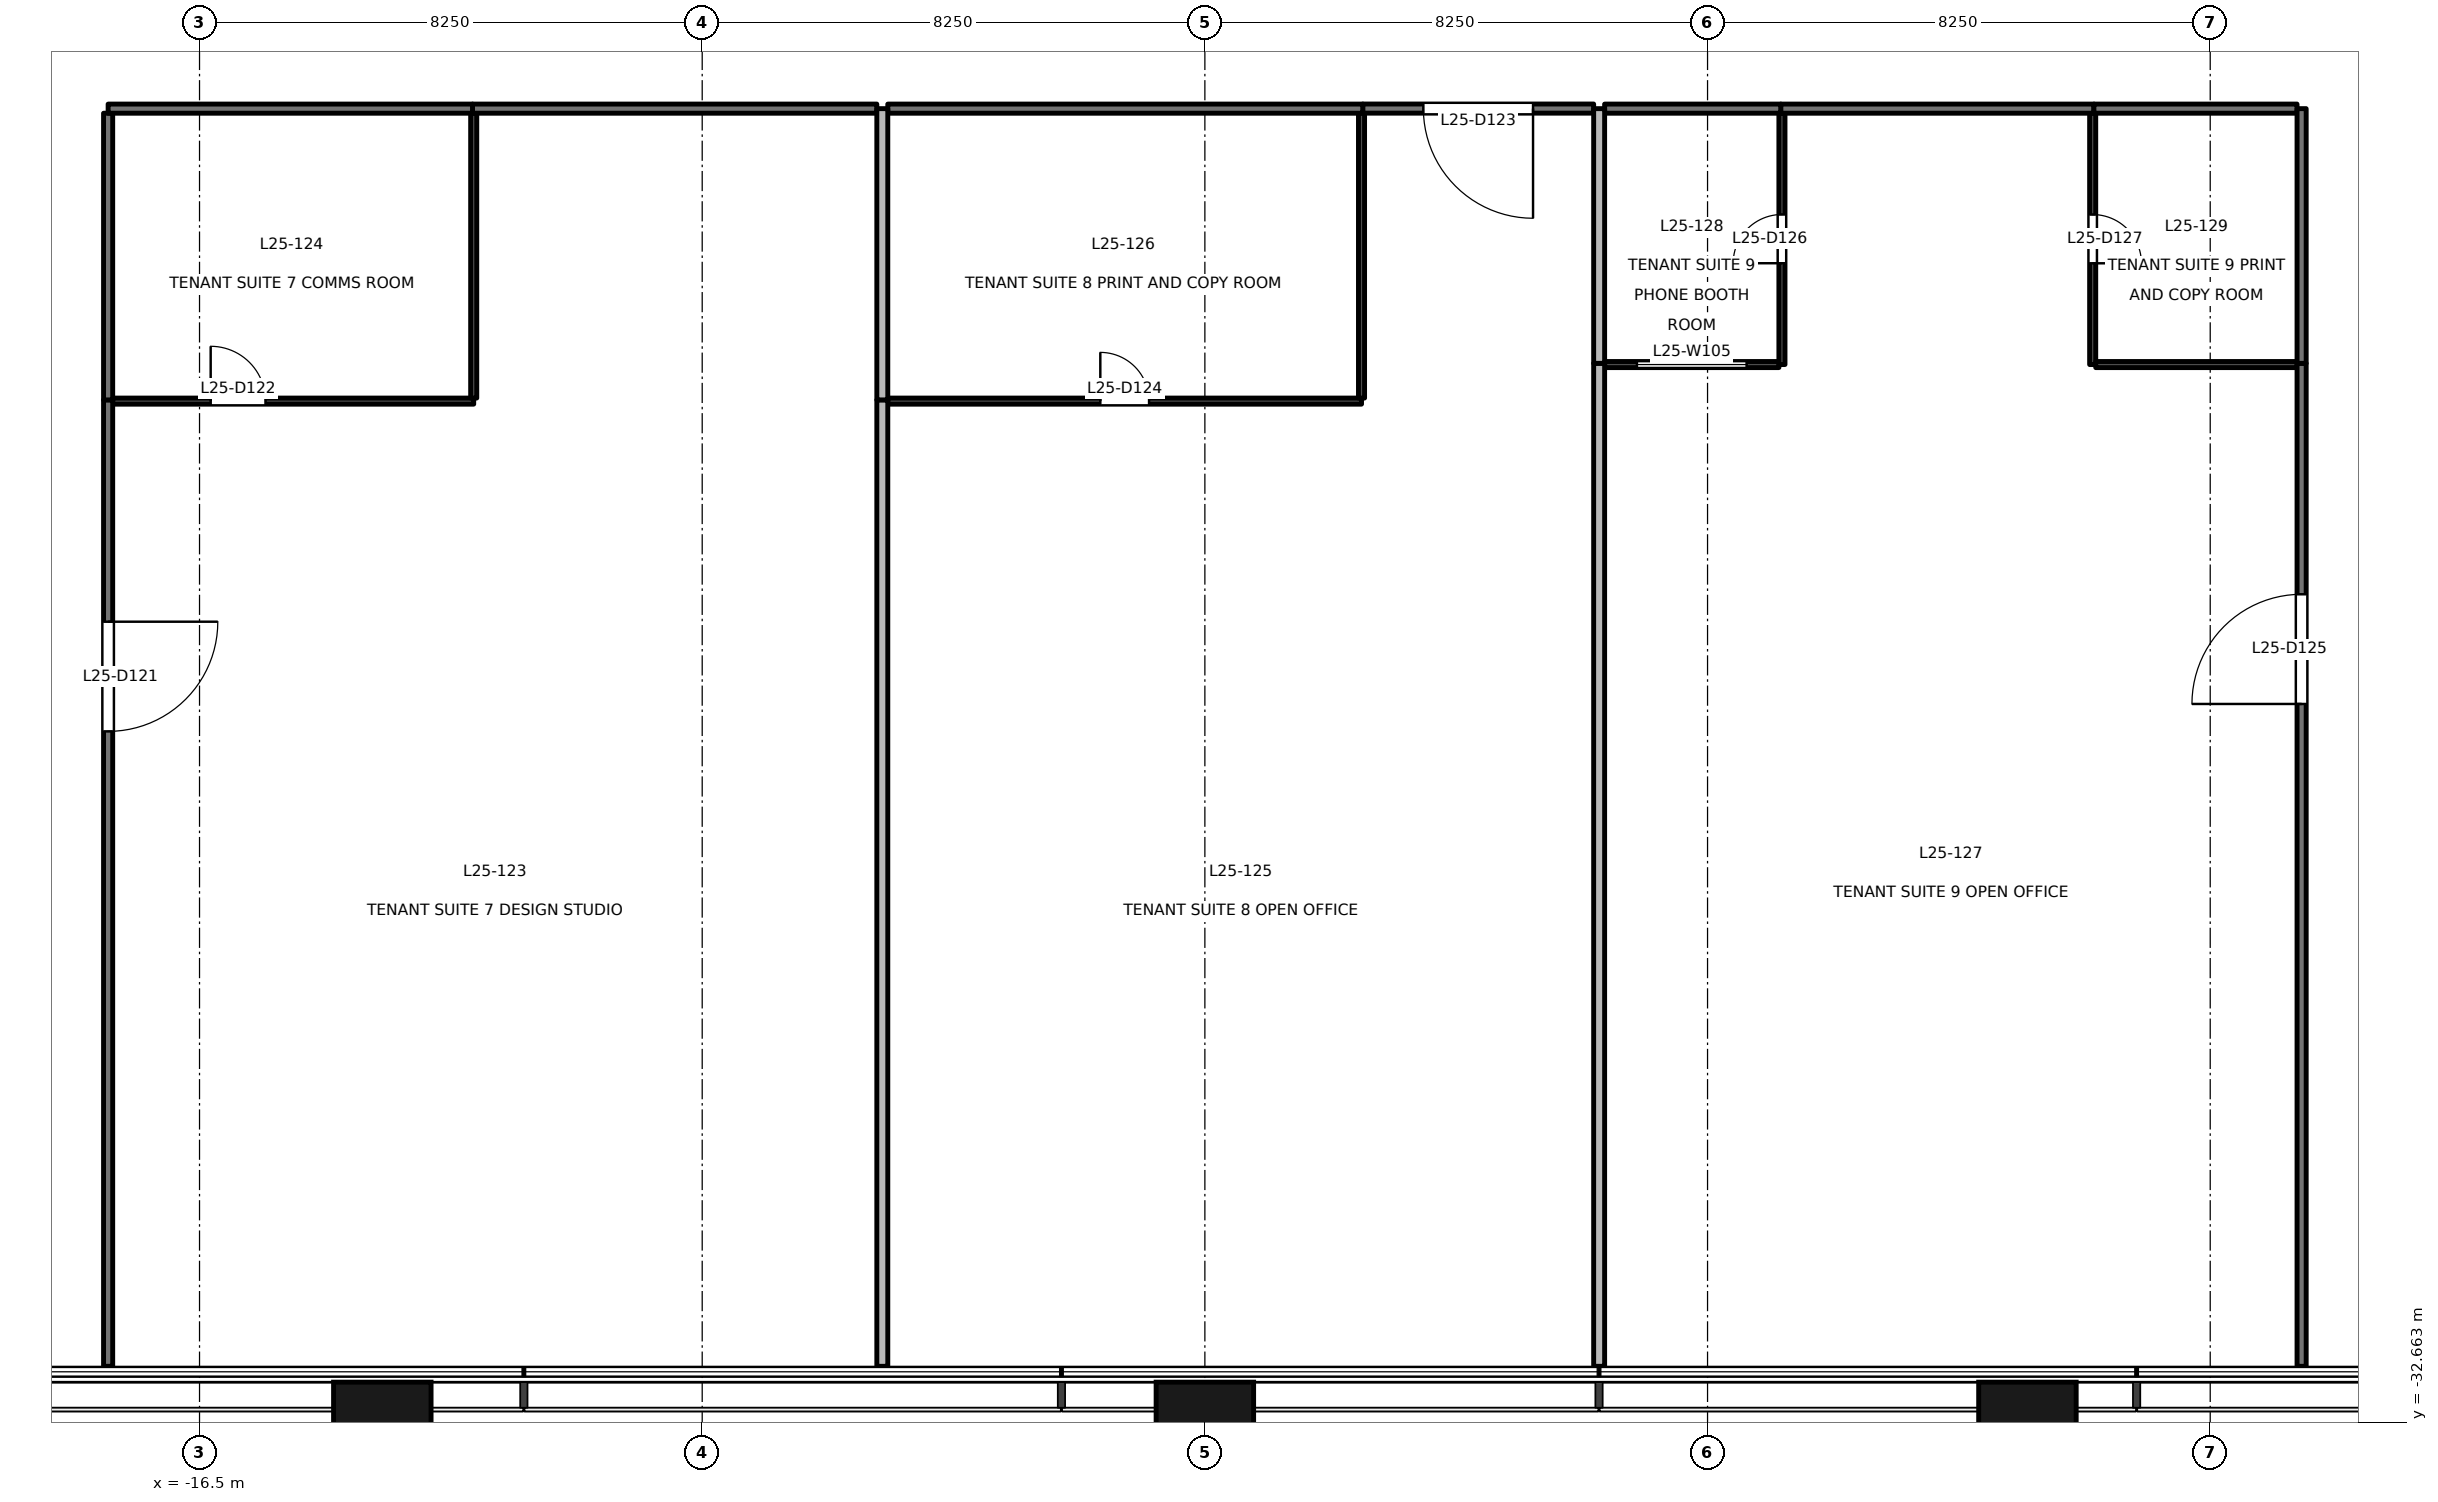
"""IFC4 building model, lengths in metres.
Left out: names, types, materials, properties, quantities, classifications, styles, units other than length and angle.
Written with IfcOpenShell. Run it as: python <this file> out.ifc"""

import sys

from ifc_helpers import new_model, si_unit, direction, frame, frame_2d, origin, origin_2d, place, context, subcontext, project, spatial, rectangle, extrude, element, fill, save


model = new_model("IFC4")
c1 = context("Model", 3, precision=1e-05, world=origin(), true_north=direction((0.0, 1.0)))
c2 = subcontext(c1, "Body", "Model", "MODEL_VIEW")
j1 = project(units=[si_unit("LENGTHUNIT", "METRE"), si_unit("PLANEANGLEUNIT", "RADIAN")], contexts=[c1])
p1 = place(None, origin())
s1 = spatial("IfcSite", under=j1, at=p1, CompositionType="ELEMENT")
p2 = place(p1, origin())
s2 = spatial("IfcBuilding", under=s1, at=p2, CompositionType="ELEMENT")
p3 = place(p2, frame((0.0, 0.0, 111.7)))
s3 = spatial("IfcBuildingStorey", under=s2, at=p3, CompositionType="ELEMENT", Elevation=111.7)
for number, where, z_axis, x_axis in (
    (1, (-13.5, -32.9, -0.2), (0.0, 0.0, 1.0), (1.0, 0.0, 0.0)),
    (2, (0.0, -32.9, -0.2), (0.0, 0.0, 1.0), (1.0, 0.0, 0.0)),
    (3, (13.5, -32.9, -0.2), (0.0, 0.0, 1.0), (1.0, 0.0, 0.0)),
):
    element("IfcColumn", number, at=place(p3, frame(where, z_axis=z_axis, x_axis=x_axis)), inside=s3, PredefinedType="COLUMN", context=c2, shape_type="SweptSolid", body=[
        extrude(rectangle(XDim=1.6, YDim=1.8, at=origin_2d()), origin(), (0.0, 0.0, 1.0), 4.0),
    ])
p4 = place(p3, frame((-18.0, -15.88, 0.0), z_axis=(0.0, 0.0, 1.0), x_axis=(0.0, -1.0, 0.0)))
e4 = element("IfcWall", 4, at=p4, inside=s3, PredefinedType="PARTITIONING", context=c2, shape_type="SweptSolid", body=[
    extrude(rectangle(XDim=15.86, YDim=0.15, at=frame_2d((7.93, 0.0))), origin(), (0.0, 0.0, 1.0), 3.8),
])
p5 = place(p4, frame((3.64, 0.0, 0.0)))
e5 = element("IfcOpeningElement", 5, at=p5, cuts=e4, PredefinedType="OPENING", context=c2, shape_type="SweptSolid", body=[
    extrude(rectangle(XDim=1.8, YDim=2.1, at=frame_2d((0.9, 1.05))), frame((0.0, 0.085, 0.0), z_axis=(0.0, -1.0, 0.0), x_axis=(1.0, 0.0, 0.0)), (0.0, 0.0, 1.0), 0.171),
])
p6 = place(p3, frame((-5.384, -11.1, 0.0), z_axis=(0.0, 0.0, 1.0), x_axis=(-1.0, 0.0, 0.0)))
e6 = element("IfcWall", 6, at=p6, inside=s3, PredefinedType="PARTITIONING", context=c2, shape_type="SweptSolid", body=[
    extrude(rectangle(XDim=6.636, YDim=0.15, at=frame_2d((3.318, 0.0))), origin(), (0.0, 0.0, 1.0), 2.8),
])
p7 = place(p3, frame((-18.0, -11.175, 0.0), z_axis=(0.0, 0.0, 1.0), x_axis=(0.0, -1.0, 0.0)))
e7 = element("IfcWall", 7, at=p7, inside=s3, PredefinedType="PARTITIONING", context=c2, shape_type="SweptSolid", body=[
    extrude(rectangle(XDim=4.705, YDim=0.15, at=frame_2d((2.353, 0.0))), origin(), (0.0, 0.0, 1.0), 3.8),
])
p8 = place(p3, frame((-12.02, -11.1, 0.0), z_axis=(0.0, 0.0, 1.0), x_axis=(-1.0, 0.0, 0.0)))
e8 = element("IfcWall", 8, at=p8, inside=s3, PredefinedType="PARTITIONING", context=c2, shape_type="SweptSolid", body=[
    extrude(rectangle(XDim=5.98, YDim=0.15, at=frame_2d((2.99, 0.0))), origin(), (0.0, 0.0, 1.0), 2.8),
])
p9 = place(p3, frame((6.381, -11.099, 0.0), z_axis=(0.0, 0.0, 1.0), x_axis=(-1.0, 0.0, 0.0)))
e9 = element("IfcWall", 9, at=p9, inside=s3, PredefinedType="PARTITIONING", context=c2, shape_type="SweptSolid", body=[
    extrude(rectangle(XDim=3.79, YDim=0.15, at=frame_2d((1.895, 0.0))), origin(), (0.0, 0.0, 1.0), 2.8),
])
p10 = place(p9, frame((0.995, 0.0, 0.0)))
e10 = element("IfcOpeningElement", 10, at=p10, cuts=e9, PredefinedType="OPENING", context=c2, shape_type="SweptSolid", body=[
    extrude(rectangle(XDim=1.8, YDim=2.1, at=frame_2d((0.9, 1.05))), frame((0.0, 0.085, 0.0), z_axis=(0.0, -1.0, 0.0), x_axis=(1.0, 0.0, 0.0)), (0.0, 0.0, 1.0), 0.171),
])
p11 = place(p3, frame((2.591, -11.1, 0.0), z_axis=(0.0, 0.0, 1.0), x_axis=(-1.0, 0.0, 0.0)))
e11 = element("IfcWall", 11, at=p11, inside=s3, PredefinedType="PARTITIONING", context=c2, shape_type="SweptSolid", body=[
    extrude(rectangle(XDim=7.795, YDim=0.15, at=frame_2d((3.897, 0.0))), origin(), (0.0, 0.0, 1.0), 2.8),
])
p12 = place(p3, frame((14.591, -11.1, 0.0), z_axis=(0.0, 0.0, 1.0), x_axis=(-1.0, 0.0, 0.0)))
e12 = element("IfcWall", 12, at=p12, inside=s3, PredefinedType="PARTITIONING", context=c2, shape_type="SweptSolid", body=[
    extrude(rectangle(XDim=5.14, YDim=0.15, at=frame_2d((2.57, 0.0))), origin(), (0.0, 0.0, 1.0), 2.8),
])
p13 = place(p3, frame((18.0, -31.74, 0.0), z_axis=(0.0, 0.0, 1.0), x_axis=(0.0, 1.0, 0.0)))
e13 = element("IfcWall", 13, at=p13, inside=s3, PredefinedType="PARTITIONING", context=c2, shape_type="SweptSolid", body=[
    extrude(rectangle(XDim=16.46, YDim=0.15, at=frame_2d((8.23, 0.0))), origin(), (0.0, 0.0, 1.0), 2.4),
])
p14 = place(p13, frame((10.87, 0.0, 0.0)))
e14 = element("IfcOpeningElement", 14, at=p14, cuts=e13, PredefinedType="OPENING", context=c2, shape_type="SweptSolid", body=[
    extrude(rectangle(XDim=1.8, YDim=2.1, at=frame_2d((0.9, 1.05))), frame((0.0, 0.085, 0.0), z_axis=(0.0, -1.0, 0.0), x_axis=(1.0, 0.0, 0.0)), (0.0, 0.0, 1.0), 0.171),
])
p15 = place(p3, frame((9.451, -11.1, 0.0), z_axis=(0.0, 0.0, 1.0), x_axis=(-1.0, 0.0, 0.0)))
e15 = element("IfcWall", 15, at=p15, inside=s3, PredefinedType="PARTITIONING", context=c2, shape_type="SweptSolid", body=[
    extrude(rectangle(XDim=2.89, YDim=0.15, at=frame_2d((1.445, 0.0))), origin(), (0.0, 0.0, 1.0), 2.8),
])
p16 = place(p3, frame((17.925, -11.1, 0.0), z_axis=(0.0, 0.0, 1.0), x_axis=(-1.0, 0.0, 0.0)))
e16 = element("IfcWall", 16, at=p16, inside=s3, PredefinedType="PARTITIONING", context=c2, shape_type="SweptSolid", body=[
    extrude(rectangle(XDim=3.334, YDim=0.15, at=frame_2d((1.667, 0.0))), origin(), (0.0, 0.0, 1.0), 2.4),
])
p17 = place(p3, frame((18.0, -15.28, 0.0), z_axis=(0.0, 0.0, 1.0), x_axis=(0.0, 1.0, 0.0)))
e17 = element("IfcWall", 17, at=p17, inside=s3, PredefinedType="PARTITIONING", context=c2, shape_type="SweptSolid", body=[
    extrude(rectangle(XDim=4.18, YDim=0.15, at=frame_2d((2.09, 0.0))), origin(), (0.0, 0.0, 1.0), 2.4),
])
p18 = place(p3, frame((-17.925, -15.9, 0.0), z_axis=(0.0, 0.0, 1.0), x_axis=(1.0, 0.0, 0.0)))
e18 = element("IfcWall", 18, at=p18, inside=s3, PredefinedType="PARTITIONING", context=c2, shape_type="SweptSolid", body=[
    extrude(rectangle(XDim=5.925, YDim=0.1, at=frame_2d((2.962, 0.0))), origin(), (0.0, 0.0, 1.0), 2.8),
])
p19 = place(p18, frame((1.608, 0.0, 0.0)))
e19 = element("IfcOpeningElement", 19, at=p19, cuts=e18, PredefinedType="OPENING", context=c2, shape_type="SweptSolid", body=[
    extrude(rectangle(XDim=0.9, YDim=2.1, at=frame_2d((0.45, 1.05))), frame((0.0, 0.061, 0.0), z_axis=(0.0, -1.0, 0.0), x_axis=(1.0, 0.0, 0.0)), (0.0, 0.0, 1.0), 0.121),
])
p20 = place(p3, frame((-12.0, -15.85, 0.0), z_axis=(0.0, 0.0, 1.0), x_axis=(0.0, 1.0, 0.0)))
e20 = element("IfcWall", 20, at=p20, inside=s3, PredefinedType="PARTITIONING", context=c2, shape_type="SweptSolid", body=[
    extrude(rectangle(XDim=4.675, YDim=0.1, at=frame_2d((2.337, 0.0))), origin(), (0.0, 0.0, 1.0), 3.8),
])
p21 = place(p3, frame((-5.294, -15.88, 0.0), z_axis=(0.0, 0.0, 1.0), x_axis=(0.0, -1.0, 0.0)))
e21 = element("IfcWall", 21, at=p21, inside=s3, PredefinedType="PARTITIONING", context=c2, shape_type="SweptSolid", body=[
    extrude(rectangle(XDim=15.86, YDim=0.18, at=frame_2d((7.93, 0.0))), origin(), (0.0, 0.0, 1.0), 3.8),
])
p22 = place(p3, frame((-5.294, -11.1, 0.0), z_axis=(0.0, 0.0, 1.0), x_axis=(0.0, -1.0, 0.0)))
e22 = element("IfcWall", 22, at=p22, inside=s3, PredefinedType="PARTITIONING", context=c2, shape_type="SweptSolid", body=[
    extrude(rectangle(XDim=4.78, YDim=0.18, at=frame_2d((2.39, 0.0))), origin(), (0.0, 0.0, 1.0), 3.8),
])
p23 = place(p3, frame((-5.204, -15.9, 0.0), z_axis=(0.0, 0.0, 1.0), x_axis=(1.0, 0.0, 0.0)))
e23 = element("IfcWall", 23, at=p23, inside=s3, PredefinedType="PARTITIONING", context=c2, shape_type="SweptSolid", body=[
    extrude(rectangle(XDim=7.775, YDim=0.1, at=frame_2d((3.888, 0.0))), origin(), (0.0, 0.0, 1.0), 2.8),
])
p24 = place(p23, frame((3.488, 0.0, 0.0)))
e24 = element("IfcOpeningElement", 24, at=p24, cuts=e23, PredefinedType="OPENING", context=c2, shape_type="SweptSolid", body=[
    extrude(rectangle(XDim=0.8, YDim=2.1, at=frame_2d((0.4, 1.05))), frame((0.0, 0.061, 0.0), z_axis=(0.0, -1.0, 0.0), x_axis=(1.0, 0.0, 0.0)), (0.0, 0.0, 1.0), 0.121),
])
p25 = place(p3, frame((2.571, -15.85, 0.0), z_axis=(0.0, 0.0, 1.0), x_axis=(0.0, 1.0, 0.0)))
e25 = element("IfcWall", 25, at=p25, inside=s3, PredefinedType="PARTITIONING", context=c2, shape_type="SweptSolid", body=[
    extrude(rectangle(XDim=4.675, YDim=0.1, at=frame_2d((2.337, 0.0))), origin(), (0.0, 0.0, 1.0), 3.8),
])
p26 = place(p3, frame((6.471, -15.28, 0.0), z_axis=(0.0, 0.0, 1.0), x_axis=(0.0, -1.0, 0.0)))
e26 = element("IfcWall", 26, at=p26, inside=s3, PredefinedType="PARTITIONING", context=c2, shape_type="SweptSolid", body=[
    extrude(rectangle(XDim=16.46, YDim=0.18, at=frame_2d((8.23, 0.0))), origin(), (0.0, 0.0, 1.0), 3.8),
])
p27 = place(p3, frame((6.471, -11.1, 0.0), z_axis=(0.0, 0.0, 1.0), x_axis=(0.0, -1.0, 0.0)))
e27 = element("IfcWall", 27, at=p27, inside=s3, PredefinedType="PARTITIONING", context=c2, shape_type="SweptSolid", body=[
    extrude(rectangle(XDim=4.18, YDim=0.18, at=frame_2d((2.09, 0.0))), origin(), (0.0, 0.0, 1.0), 3.8),
])
p28 = place(p3, frame((6.561, -15.3, 0.0), z_axis=(0.0, 0.0, 1.0), x_axis=(1.0, 0.0, 0.0)))
e28 = element("IfcWall", 28, at=p28, inside=s3, PredefinedType="PARTITIONING", context=c2, shape_type="SweptSolid", body=[
    extrude(rectangle(XDim=2.86, YDim=0.1, at=frame_2d((1.43, 0.0))), origin(), (0.0, 0.0, 1.0), 2.8),
])
p29 = place(p28, frame((0.53, 0.0, 0.9)))
e29 = element("IfcOpeningElement", 29, at=p29, cuts=e28, PredefinedType="OPENING", context=c2, shape_type="SweptSolid", body=[
    extrude(rectangle(XDim=1.8, YDim=1.2, at=frame_2d((0.9, 0.6))), frame((0.0, 0.061, 0.0), z_axis=(0.0, -1.0, 0.0), x_axis=(1.0, 0.0, 0.0)), (0.0, 0.0, 1.0), 0.121),
])
p30 = place(p3, frame((9.471, -15.3, 0.0), z_axis=(0.0, 0.0, 1.0), x_axis=(0.0, 1.0, 0.0)))
e30 = element("IfcWall", 30, at=p30, inside=s3, PredefinedType="PARTITIONING", context=c2, shape_type="SweptSolid", body=[
    extrude(rectangle(XDim=4.125, YDim=0.1, at=frame_2d((2.062, 0.0))), origin(), (0.0, 0.0, 1.0), 3.8),
])
p31 = place(p30, frame((1.663, 0.0, 0.0)))
e31 = element("IfcOpeningElement", 31, at=p31, cuts=e30, PredefinedType="OPENING", context=c2, shape_type="SweptSolid", body=[
    extrude(rectangle(XDim=0.8, YDim=2.1, at=frame_2d((0.4, 1.05))), frame((0.0, 0.061, 0.0), z_axis=(0.0, -1.0, 0.0), x_axis=(1.0, 0.0, 0.0)), (0.0, 0.0, 1.0), 0.121),
])
p32 = place(p3, frame((14.571, -11.175, 0.0), z_axis=(0.0, 0.0, 1.0), x_axis=(0.0, -1.0, 0.0)))
e32 = element("IfcWall", 32, at=p32, inside=s3, PredefinedType="PARTITIONING", context=c2, shape_type="SweptSolid", body=[
    extrude(rectangle(XDim=4.125, YDim=0.1, at=frame_2d((2.062, 0.0))), origin(), (0.0, 0.0, 1.0), 3.8),
])
p33 = place(p32, frame((1.663, 0.0, 0.0)))
e33 = element("IfcOpeningElement", 33, at=p33, cuts=e32, PredefinedType="OPENING", context=c2, shape_type="SweptSolid", body=[
    extrude(rectangle(XDim=0.8, YDim=2.1, at=frame_2d((0.4, 1.05))), frame((0.0, 0.061, 0.0), z_axis=(0.0, -1.0, 0.0), x_axis=(1.0, 0.0, 0.0)), (0.0, 0.0, 1.0), 0.121),
])
p34 = place(p3, frame((14.621, -15.3, 0.0), z_axis=(0.0, 0.0, 1.0), x_axis=(1.0, 0.0, 0.0)))
e34 = element("IfcWall", 34, at=p34, inside=s3, PredefinedType="PARTITIONING", context=c2, shape_type="SweptSolid", body=[
    extrude(rectangle(XDim=3.304, YDim=0.1, at=frame_2d((1.652, 0.0))), origin(), (0.0, 0.0, 1.0), 2.4),
])
p35 = place(p5, origin())
e35 = element("IfcDoor", 35, at=p35, inside=s3, OperationType="DOUBLE_DOOR_SINGLE_SWING", PredefinedType="DOOR", context=c2, shape_type="SweptSolid", body=[
    extrude(rectangle(XDim=1.8, YDim=2.1, at=frame_2d((0.9, 1.05))), frame((0.0, 0.025, 0.0), z_axis=(0.0, -1.0, 0.0), x_axis=(1.0, 0.0, 0.0)), (0.0, 0.0, 1.0), 0.05),
])
fill(e5, e35)
p36 = place(p19, origin())
e36 = element("IfcDoor", 36, at=p36, inside=s3, OperationType="SINGLE_SWING_LEFT", PredefinedType="DOOR", context=c2, shape_type="SweptSolid", body=[
    extrude(rectangle(XDim=0.9, YDim=2.1, at=frame_2d((0.45, 1.05))), frame((0.0, 0.025, 0.0), z_axis=(0.0, -1.0, 0.0), x_axis=(1.0, 0.0, 0.0)), (0.0, 0.0, 1.0), 0.05),
])
fill(e19, e36)
p37 = place(p10, origin())
e37 = element("IfcDoor", 37, at=p37, inside=s3, OperationType="DOUBLE_DOOR_SINGLE_SWING", PredefinedType="DOOR", context=c2, shape_type="SweptSolid", body=[
    extrude(rectangle(XDim=1.8, YDim=2.1, at=frame_2d((0.9, 1.05))), frame((0.0, 0.025, 0.0), z_axis=(0.0, -1.0, 0.0), x_axis=(1.0, 0.0, 0.0)), (0.0, 0.0, 1.0), 0.05),
])
fill(e10, e37)
p38 = place(p24, origin())
e38 = element("IfcDoor", 38, at=p38, inside=s3, OperationType="SINGLE_SWING_LEFT", PredefinedType="DOOR", context=c2, shape_type="SweptSolid", body=[
    extrude(rectangle(XDim=0.8, YDim=2.1, at=frame_2d((0.4, 1.05))), frame((0.0, 0.025, 0.0), z_axis=(0.0, -1.0, 0.0), x_axis=(1.0, 0.0, 0.0)), (0.0, 0.0, 1.0), 0.05),
])
fill(e24, e38)
p39 = place(p14, origin())
e39 = element("IfcDoor", 39, at=p39, inside=s3, OperationType="DOUBLE_DOOR_SINGLE_SWING", PredefinedType="DOOR", context=c2, shape_type="SweptSolid", body=[
    extrude(rectangle(XDim=1.8, YDim=2.1, at=frame_2d((0.9, 1.05))), frame((0.0, 0.025, 0.0), z_axis=(0.0, -1.0, 0.0), x_axis=(1.0, 0.0, 0.0)), (0.0, 0.0, 1.0), 0.05),
])
fill(e14, e39)
p40 = place(p31, origin())
e40 = element("IfcDoor", 40, at=p40, inside=s3, OperationType="SINGLE_SWING_LEFT", PredefinedType="DOOR", context=c2, shape_type="SweptSolid", body=[
    extrude(rectangle(XDim=0.8, YDim=2.1, at=frame_2d((0.4, 1.05))), frame((0.0, 0.025, 0.0), z_axis=(0.0, -1.0, 0.0), x_axis=(1.0, 0.0, 0.0)), (0.0, 0.0, 1.0), 0.05),
])
fill(e31, e40)
p41 = place(p33, origin())
e41 = element("IfcDoor", 41, at=p41, inside=s3, OperationType="SINGLE_SWING_RIGHT", PredefinedType="DOOR", context=c2, shape_type="SweptSolid", body=[
    extrude(rectangle(XDim=0.8, YDim=2.1, at=frame_2d((0.4, 1.05))), frame((0.0, 0.025, 0.0), z_axis=(0.0, -1.0, 0.0), x_axis=(1.0, 0.0, 0.0)), (0.0, 0.0, 1.0), 0.05),
])
fill(e33, e41)
p42 = place(p29, origin())
e42 = element("IfcWindow", 42, at=p42, inside=s3, PartitioningType="SINGLE_PANEL", PredefinedType="WINDOW", context=c2, shape_type="SweptSolid", body=[
    extrude(rectangle(XDim=1.8, YDim=1.2, at=frame_2d((0.9, 0.6))), frame((0.0, 0.03, 0.0), z_axis=(0.0, -1.0, 0.0), x_axis=(1.0, 0.0, 0.0)), (0.0, 0.0, 1.0), 0.06),
])
fill(e29, e42)
save(model, sys.argv[1])
